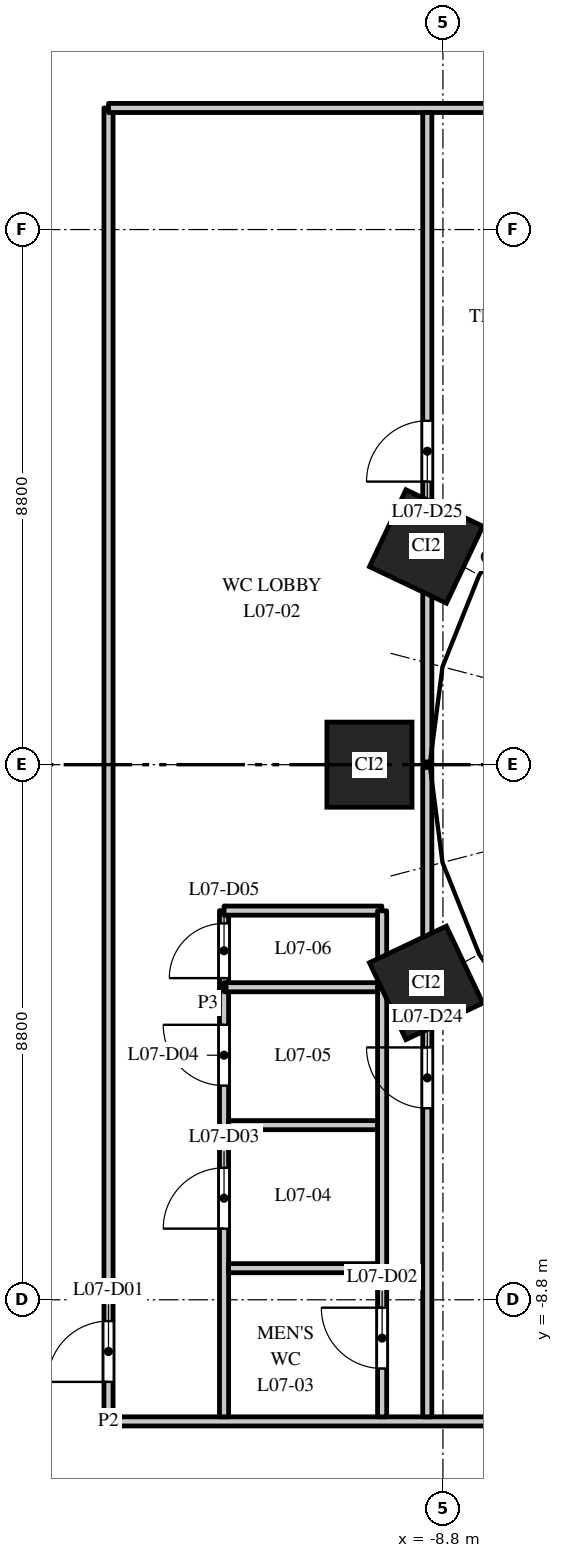
"""IFC4 building model, lengths in metres.
Left out: names, types, materials, properties, quantities, classifications, styles, units other than length and angle.
Written with IfcOpenShell. Run it as: python <this file> out.ifc"""

import sys

from ifc_helpers import new_model, si_unit, direction, frame, frame_2d, origin, origin_2d, place, context, subcontext, project, spatial, rectangle, extrude, element, fill, save


model = new_model("IFC4")
c1 = context("Model", 3, precision=1e-05, world=origin(), true_north=direction((0.0, 1.0)))
c2 = subcontext(c1, "Body", "Model", "MODEL_VIEW")
j1 = project(units=[si_unit("LENGTHUNIT", "METRE"), si_unit("PLANEANGLEUNIT", "RADIAN")], contexts=[c1])
p1 = place(None, origin())
s1 = spatial("IfcSite", under=j1, at=p1, CompositionType="ELEMENT")
p2 = place(p1, origin())
s2 = spatial("IfcBuilding", under=s1, at=p2, CompositionType="ELEMENT")
p3 = place(p2, frame((0.0, 0.0, 38.5)))
s3 = spatial("IfcBuildingStorey", under=s2, at=p3, CompositionType="ELEMENT", Elevation=38.5)
for number, where, z_axis, x_axis in (
    (1, (-9.076, 3.588, 0.0), (0.0, 0.0, 1.0), (-0.429, -0.903, 0.0)),
    (2, (-10.008, 0.0, 0.0), (0.0, 0.0, 1.0), (0.0, -1.0, 0.0)),
    (3, (-9.076, -3.588, 0.0), (0.0, 0.0, 1.0), (0.429, -0.903, 0.0)),
):
    element("IfcColumn", number, at=place(p3, frame(where, z_axis=z_axis, x_axis=x_axis)), inside=s3, PredefinedType="COLUMN", context=c2, shape_type="SweptSolid", body=[
        extrude(rectangle(XDim=1.4, YDim=1.4, at=origin_2d()), origin(), (0.0, 0.0, 1.0), 4.0),
    ])
p4 = place(p3, frame((-14.3, -10.8, 0.0), z_axis=(0.0, 0.0, 1.0), x_axis=(0.0, 1.0, 0.0)))
e4 = element("IfcWall", 4, at=p4, inside=s3, PredefinedType="PARTITIONING", context=c2, shape_type="SweptSolid", body=[
    extrude(rectangle(XDim=21.6, YDim=0.15, at=frame_2d((10.8, 0.0))), origin(), (0.0, 0.0, 1.0), 2.75),
])
p5 = place(p4, frame((0.65, 0.0, 0.0)))
e5 = element("IfcOpeningElement", 5, at=p5, cuts=e4, PredefinedType="OPENING", context=c2, shape_type="SweptSolid", body=[
    extrude(rectangle(XDim=1.0, YDim=2.1, at=frame_2d((0.5, 1.05))), frame((0.0, 0.085, 0.0), z_axis=(0.0, -1.0, 0.0), x_axis=(1.0, 0.0, 0.0)), (0.0, 0.0, 1.0), 0.17),
])
p6 = place(p3, frame((-14.3, -10.8, 0.0), z_axis=(0.0, 0.0, 1.0), x_axis=(1.0, 0.0, 0.0)))
e6 = element("IfcWall", 6, at=p6, inside=s3, PredefinedType="PARTITIONING", context=c2, shape_type="SweptSolid", body=[
    extrude(rectangle(XDim=28.6, YDim=0.15, at=frame_2d((14.3, 0.0))), origin(), (0.0, 0.0, 1.0), 2.85),
])
p7 = place(p6, frame((10.627, 0.0, 0.0)))
e7 = element("IfcOpeningElement", 7, at=p7, cuts=e6, PredefinedType="OPENING", context=c2, shape_type="SweptSolid", body=[
    extrude(rectangle(XDim=1.0, YDim=2.1, at=frame_2d((0.5, 1.05))), frame((0.0, 0.085, 0.0), z_axis=(0.0, -1.0, 0.0), x_axis=(1.0, 0.0, 0.0)), (0.0, 0.0, 1.0), 0.17),
])
p8 = place(p6, frame((15.393, 0.0, 0.0)))
e8 = element("IfcOpeningElement", 8, at=p8, cuts=e6, PredefinedType="OPENING", context=c2, shape_type="SweptSolid", body=[
    extrude(rectangle(XDim=1.0, YDim=2.1, at=frame_2d((0.5, 1.05))), frame((0.0, 0.085, 0.0), z_axis=(0.0, -1.0, 0.0), x_axis=(1.0, 0.0, 0.0)), (0.0, 0.0, 1.0), 0.17),
])
p9 = place(p3, frame((-14.3, 10.8, 0.0), z_axis=(0.0, 0.0, 1.0), x_axis=(1.0, 0.0, 0.0)))
e9 = element("IfcWall", 9, at=p9, inside=s3, PredefinedType="PARTITIONING", context=c2, shape_type="SweptSolid", body=[
    extrude(rectangle(XDim=28.6, YDim=0.15, at=frame_2d((14.3, 0.0))), origin(), (0.0, 0.0, 1.0), 2.85),
])
p10 = place(p9, frame((10.66, 0.0, 0.0)))
e10 = element("IfcOpeningElement", 10, at=p10, cuts=e9, PredefinedType="OPENING", context=c2, shape_type="SweptSolid", body=[
    extrude(rectangle(XDim=1.0, YDim=2.1, at=frame_2d((0.5, 1.05))), frame((0.0, 0.085, 0.0), z_axis=(0.0, -1.0, 0.0), x_axis=(1.0, 0.0, 0.0)), (0.0, 0.0, 1.0), 0.17),
])
p11 = place(p9, frame((15.427, 0.0, 0.0)))
e11 = element("IfcOpeningElement", 11, at=p11, cuts=e9, PredefinedType="OPENING", context=c2, shape_type="SweptSolid", body=[
    extrude(rectangle(XDim=1.0, YDim=2.1, at=frame_2d((0.5, 1.05))), frame((0.0, 0.085, 0.0), z_axis=(0.0, -1.0, 0.0), x_axis=(1.0, 0.0, 0.0)), (0.0, 0.0, 1.0), 0.17),
])
p12 = place(p9, frame((22.693, 0.0, 0.0)))
e12 = element("IfcOpeningElement", 12, at=p12, cuts=e9, PredefinedType="OPENING", context=c2, shape_type="SweptSolid", body=[
    extrude(rectangle(XDim=1.0, YDim=2.1, at=frame_2d((0.5, 1.05))), frame((0.0, 0.085, 0.0), z_axis=(0.0, -1.0, 0.0), x_axis=(1.0, 0.0, 0.0)), (0.0, 0.0, 1.0), 0.17),
])
p13 = place(p3, frame((-12.4, -10.725, 0.0), z_axis=(0.0, 0.0, 1.0), x_axis=(0.0, 1.0, 0.0)))
e13 = element("IfcWall", 13, at=p13, inside=s3, PredefinedType="PARTITIONING", context=c2, shape_type="SweptSolid", body=[
    extrude(rectangle(XDim=7.065, YDim=0.15, at=frame_2d((3.533, 0.0))), origin(), (0.0, 0.0, 1.0), 2.75),
])
p14 = place(p13, frame((3.095, 0.0, 0.0)))
e14 = element("IfcOpeningElement", 14, at=p14, cuts=e13, PredefinedType="OPENING", context=c2, shape_type="SweptSolid", body=[
    extrude(rectangle(XDim=1.0, YDim=2.1, at=frame_2d((0.5, 1.05))), frame((0.0, 0.085, 0.0), z_axis=(0.0, -1.0, 0.0), x_axis=(1.0, 0.0, 0.0)), (0.0, 0.0, 1.0), 0.17),
])
p15 = place(p13, frame((5.447, 0.0, 0.0)))
e15 = element("IfcOpeningElement", 15, at=p15, cuts=e13, PredefinedType="OPENING", context=c2, shape_type="SweptSolid", body=[
    extrude(rectangle(XDim=1.0, YDim=2.1, at=frame_2d((0.5, 1.05))), frame((0.0, 0.085, 0.0), z_axis=(0.0, -1.0, 0.0), x_axis=(1.0, 0.0, 0.0)), (0.0, 0.0, 1.0), 0.17),
])
p16 = place(p3, frame((-12.325, -8.28, 0.0), z_axis=(0.0, 0.0, 1.0), x_axis=(1.0, 0.0, 0.0)))
e16 = element("IfcWall", 16, at=p16, inside=s3, PredefinedType="PARTITIONING", context=c2, shape_type="SweptSolid", body=[
    extrude(rectangle(XDim=2.45, YDim=0.15, at=frame_2d((1.225, 0.0))), origin(), (0.0, 0.0, 1.0), 2.75),
])
p17 = place(p3, frame((-12.325, -5.928, 0.0), z_axis=(0.0, 0.0, 1.0), x_axis=(1.0, 0.0, 0.0)))
e17 = element("IfcWall", 17, at=p17, inside=s3, PredefinedType="PARTITIONING", context=c2, shape_type="SweptSolid", body=[
    extrude(rectangle(XDim=2.45, YDim=0.15, at=frame_2d((1.225, 0.0))), origin(), (0.0, 0.0, 1.0), 3.7),
])
p18 = place(p3, frame((-12.4, -3.66, 0.0), z_axis=(0.0, 0.0, 1.0), x_axis=(0.0, 1.0, 0.0)))
e18 = element("IfcWall", 18, at=p18, inside=s3, PredefinedType="PARTITIONING", context=c2, shape_type="SweptSolid", body=[
    extrude(rectangle(XDim=1.26, YDim=0.15, at=frame_2d((0.63, 0.0))), origin(), (0.0, 0.0, 1.0), 3.7),
])
p19 = place(p18, frame((0.15, 0.0, 0.0)))
e19 = element("IfcOpeningElement", 19, at=p19, cuts=e18, PredefinedType="OPENING", context=c2, shape_type="SweptSolid", body=[
    extrude(rectangle(XDim=0.9, YDim=2.1, at=frame_2d((0.45, 1.05))), frame((0.0, 0.085, 0.0), z_axis=(0.0, -1.0, 0.0), x_axis=(1.0, 0.0, 0.0)), (0.0, 0.0, 1.0), 0.17),
])
p20 = place(p3, frame((-12.4, -3.66, 0.0), z_axis=(0.0, 0.0, 1.0), x_axis=(1.0, 0.0, 0.0)))
e20 = element("IfcWall", 20, at=p20, inside=s3, PredefinedType="PARTITIONING", context=c2, shape_type="SweptSolid", body=[
    extrude(rectangle(XDim=2.6, YDim=0.15, at=frame_2d((1.3, 0.0))), origin(), (0.0, 0.0, 1.0), 3.7),
])
p21 = place(p3, frame((-12.4, -2.4, 0.0), z_axis=(0.0, 0.0, 1.0), x_axis=(1.0, 0.0, 0.0)))
e21 = element("IfcWall", 21, at=p21, inside=s3, PredefinedType="PARTITIONING", context=c2, shape_type="SweptSolid", body=[
    extrude(rectangle(XDim=2.596, YDim=0.15, at=frame_2d((1.298, 0.0))), origin(), (0.0, 0.0, 1.0), 3.7),
])
p22 = place(p3, frame((-9.8, -10.725, 0.0), z_axis=(0.0, 0.0, 1.0), x_axis=(0.0, 1.0, 0.0)))
e22 = element("IfcWall", 22, at=p22, inside=s3, PredefinedType="PARTITIONING", context=c2, shape_type="SweptSolid", body=[
    extrude(rectangle(XDim=7.065, YDim=0.15, at=frame_2d((3.533, 0.0))), origin(), (0.0, 0.0, 1.0), 2.75),
])
p23 = place(p22, frame((0.795, 0.0, 0.0)))
e23 = element("IfcOpeningElement", 23, at=p23, cuts=e22, PredefinedType="OPENING", context=c2, shape_type="SweptSolid", body=[
    extrude(rectangle(XDim=1.0, YDim=2.1, at=frame_2d((0.5, 1.05))), frame((0.0, 0.085, 0.0), z_axis=(0.0, -1.0, 0.0), x_axis=(1.0, 0.0, 0.0)), (0.0, 0.0, 1.0), 0.17),
])
p24 = place(p3, frame((-9.8, -3.66, 0.0), z_axis=(0.0, 0.0, 1.0), x_axis=(0.0, 1.0, 0.0)))
e24 = element("IfcWall", 24, at=p24, inside=s3, PredefinedType="PARTITIONING", context=c2, shape_type="SweptSolid", body=[
    extrude(rectangle(XDim=1.256, YDim=0.15, at=frame_2d((0.628, 0.0))), origin(), (0.0, 0.0, 1.0), 3.7),
])
p25 = place(p3, frame((-9.057, -10.725, 0.0), z_axis=(0.0, 0.0, 1.0), x_axis=(0.0, 1.0, 0.0)))
e25 = element("IfcWall", 25, at=p25, inside=s3, PredefinedType="PARTITIONING", context=c2, shape_type="SweptSolid", body=[
    extrude(rectangle(XDim=10.68, YDim=0.15, at=frame_2d((5.34, 0.0))), origin(), (0.0, 0.0, 1.0), 2.75),
])
p26 = place(p25, frame((5.075, 0.0, 0.0)))
e26 = element("IfcOpeningElement", 26, at=p26, cuts=e25, PredefinedType="OPENING", context=c2, shape_type="SweptSolid", body=[
    extrude(rectangle(XDim=1.0, YDim=2.1, at=frame_2d((0.5, 1.05))), frame((0.0, 0.085, 0.0), z_axis=(0.0, -1.0, 0.0), x_axis=(1.0, 0.0, 0.0)), (0.0, 0.0, 1.0), 0.17),
])
p27 = place(p3, frame((-9.057, 0.045, 0.0), z_axis=(0.0, 0.0, 1.0), x_axis=(0.0, 1.0, 0.0)))
e27 = element("IfcWall", 27, at=p27, inside=s3, PredefinedType="PARTITIONING", context=c2, shape_type="SweptSolid", body=[
    extrude(rectangle(XDim=10.68, YDim=0.15, at=frame_2d((5.34, 0.0))), origin(), (0.0, 0.0, 1.0), 2.75),
])
p28 = place(p27, frame((4.61, 0.0, 0.0)))
e28 = element("IfcOpeningElement", 28, at=p28, cuts=e27, PredefinedType="OPENING", context=c2, shape_type="SweptSolid", body=[
    extrude(rectangle(XDim=1.0, YDim=2.1, at=frame_2d((0.5, 1.05))), frame((0.0, 0.085, 0.0), z_axis=(0.0, -1.0, 0.0), x_axis=(1.0, 0.0, 0.0)), (0.0, 0.0, 1.0), 0.17),
])
p29 = place(p5, origin())
e29 = element("IfcDoor", 29, at=p29, inside=s3, OperationType="SINGLE_SWING_LEFT", PredefinedType="DOOR", context=c2, shape_type="SweptSolid", body=[
    extrude(rectangle(XDim=1.0, YDim=2.1, at=frame_2d((0.5, 1.05))), frame((0.0, 0.025, 0.0), z_axis=(0.0, -1.0, 0.0), x_axis=(1.0, 0.0, 0.0)), (0.0, 0.0, 1.0), 0.05),
])
fill(e5, e29)
p30 = place(p23, origin())
e30 = element("IfcDoor", 30, at=p30, inside=s3, OperationType="SINGLE_SWING_RIGHT", PredefinedType="DOOR", context=c2, shape_type="SweptSolid", body=[
    extrude(rectangle(XDim=1.0, YDim=2.1, at=frame_2d((0.5, 1.05))), frame((0.0, 0.025, 0.0), z_axis=(0.0, -1.0, 0.0), x_axis=(1.0, 0.0, 0.0)), (0.0, 0.0, 1.0), 0.05),
])
fill(e23, e30)
p31 = place(p14, origin())
e31 = element("IfcDoor", 31, at=p31, inside=s3, OperationType="SINGLE_SWING_LEFT", PredefinedType="DOOR", context=c2, shape_type="SweptSolid", body=[
    extrude(rectangle(XDim=1.0, YDim=2.1, at=frame_2d((0.5, 1.05))), frame((0.0, 0.025, 0.0), z_axis=(0.0, -1.0, 0.0), x_axis=(1.0, 0.0, 0.0)), (0.0, 0.0, 1.0), 0.05),
])
fill(e14, e31)
p32 = place(p15, origin())
e32 = element("IfcDoor", 32, at=p32, inside=s3, OperationType="SINGLE_SWING_RIGHT", PredefinedType="DOOR", context=c2, shape_type="SweptSolid", body=[
    extrude(rectangle(XDim=1.0, YDim=2.1, at=frame_2d((0.5, 1.05))), frame((0.0, 0.025, 0.0), z_axis=(0.0, -1.0, 0.0), x_axis=(1.0, 0.0, 0.0)), (0.0, 0.0, 1.0), 0.05),
])
fill(e15, e32)
p33 = place(p19, origin())
e33 = element("IfcDoor", 33, at=p33, inside=s3, OperationType="SINGLE_SWING_LEFT", PredefinedType="DOOR", context=c2, shape_type="SweptSolid", body=[
    extrude(rectangle(XDim=0.9, YDim=2.1, at=frame_2d((0.45, 1.05))), frame((0.0, 0.025, 0.0), z_axis=(0.0, -1.0, 0.0), x_axis=(1.0, 0.0, 0.0)), (0.0, 0.0, 1.0), 0.05),
])
fill(e19, e33)
p34 = place(p26, origin())
e34 = element("IfcDoor", 34, at=p34, inside=s3, OperationType="SINGLE_SWING_RIGHT", PredefinedType="DOOR", context=c2, shape_type="SweptSolid", body=[
    extrude(rectangle(XDim=1.0, YDim=2.1, at=frame_2d((0.5, 1.05))), frame((0.0, 0.025, 0.0), z_axis=(0.0, -1.0, 0.0), x_axis=(1.0, 0.0, 0.0)), (0.0, 0.0, 1.0), 0.05),
])
fill(e26, e34)
p35 = place(p28, origin())
e35 = element("IfcDoor", 35, at=p35, inside=s3, OperationType="SINGLE_SWING_LEFT", PredefinedType="DOOR", context=c2, shape_type="SweptSolid", body=[
    extrude(rectangle(XDim=1.0, YDim=2.1, at=frame_2d((0.5, 1.05))), frame((0.0, 0.025, 0.0), z_axis=(0.0, -1.0, 0.0), x_axis=(1.0, 0.0, 0.0)), (0.0, 0.0, 1.0), 0.05),
])
fill(e28, e35)
save(model, sys.argv[1])
